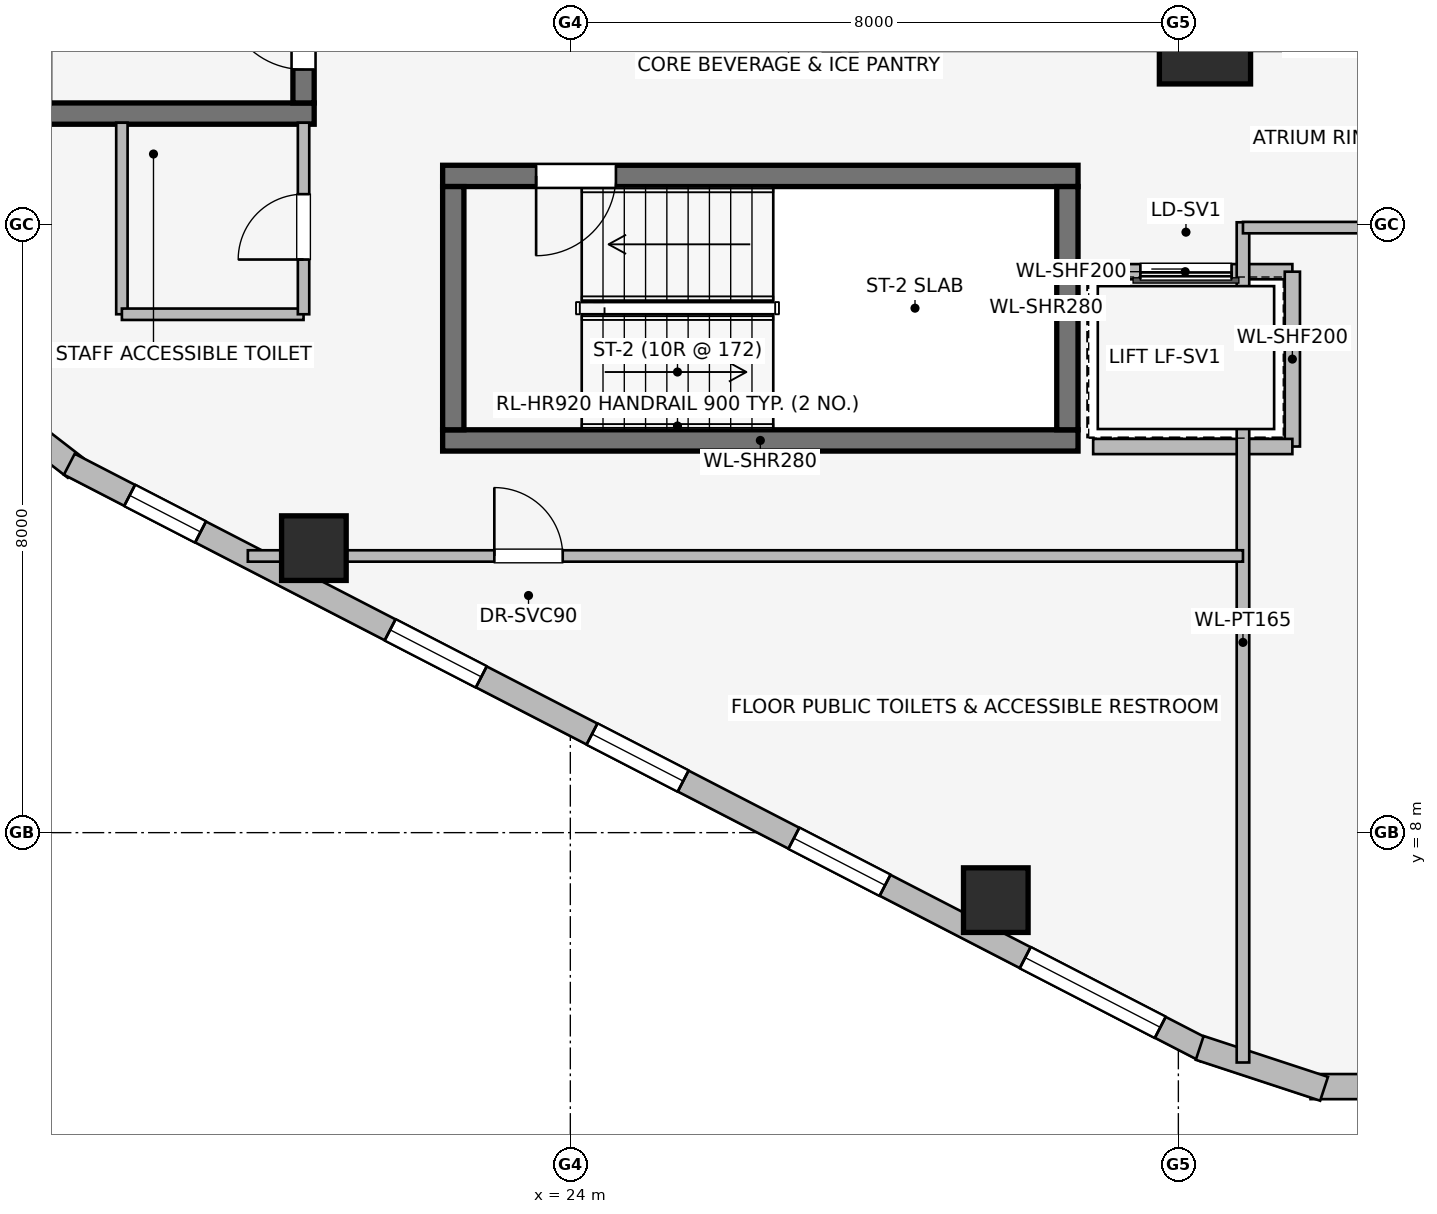
"""IFC4 building model, lengths in metres.
Left out: names, types, materials, properties, quantities, classifications, styles, units other than length and angle.
Written with IfcOpenShell. Run it as: python <this file> out.ifc"""

import sys

from ifc_helpers import new_model, si_unit, direction, frame, frame_2d, origin, origin_2d, place, context, subcontext, project, spatial, rectangle, extrude, element, fill, save


model = new_model("IFC4")
c1 = context("Model", 3, precision=1e-05, world=origin(), true_north=direction((0.0, 1.0)))
c2 = subcontext(c1, "Body", "Model", "MODEL_VIEW")
j1 = project(units=[si_unit("LENGTHUNIT", "METRE"), si_unit("PLANEANGLEUNIT", "RADIAN")], contexts=[c1])
p1 = place(None, origin())
s1 = spatial("IfcSite", under=j1, at=p1, CompositionType="ELEMENT")
p2 = place(p1, origin())
s2 = spatial("IfcBuilding", under=s1, at=p2, CompositionType="ELEMENT")
p3 = place(p2, frame((0.0, 0.0, 203.35)))
s3 = spatial("IfcBuildingStorey", under=s2, at=p3, CompositionType="ELEMENT", Elevation=203.35)
p4 = place(p3, frame((16.87, 17.46, 0.0), z_axis=(0.0, 0.0, 1.0), x_axis=(1.0, 0.0, 0.0)))
e1 = element("IfcWall", 1, at=p4, inside=s3, PredefinedType="SHEAR", context=c2, shape_type="SweptSolid", body=[
    extrude(rectangle(XDim=3.76, YDim=0.28, at=frame_2d((1.88, 0.0))), origin(), (0.0, 0.0, 1.0), 3.45),
])
p5 = place(p3, frame((20.49, 17.6, 0.0), z_axis=(0.0, 0.0, 1.0), x_axis=(0.0, 1.0, 0.0)))
e2 = element("IfcWall", 2, at=p5, inside=s3, PredefinedType="SHEAR", context=c2, shape_type="SweptSolid", body=[
    extrude(rectangle(XDim=7.8, YDim=0.28, at=frame_2d((3.9, 0.0))), origin(), (0.0, 0.0, 1.0), 3.45),
])
p6 = place(p5, frame((0.44, 0.0, 0.0)))
e3 = element("IfcOpeningElement", 3, at=p6, cuts=e2, PredefinedType="OPENING", context=c2, shape_type="SweptSolid", body=[
    extrude(rectangle(XDim=1.05, YDim=2.0, at=frame_2d((0.525, 1.0))), frame((0.0, 0.15, 0.0), z_axis=(0.0, -1.0, 0.0), x_axis=(1.0, 0.0, 0.0)), (0.0, 0.0, 1.0), 0.3),
])
p7 = place(p3, frame((22.32, 13.16, 0.0), z_axis=(0.0, 0.0, 1.0), x_axis=(1.0, 0.0, 0.0)))
e4 = element("IfcWall", 4, at=p7, inside=s3, PredefinedType="SHEAR", context=c2, shape_type="SweptSolid", body=[
    extrude(rectangle(XDim=8.36, YDim=0.28, at=frame_2d((4.18, 0.0))), origin(), (0.0, 0.0, 1.0), 3.45),
])
p8 = place(p3, frame((30.68, 16.64, 0.0), z_axis=(0.0, 0.0, 1.0), x_axis=(-1.0, 0.0, 0.0)))
e5 = element("IfcWall", 5, at=p8, inside=s3, PredefinedType="SHEAR", context=c2, shape_type="SweptSolid", body=[
    extrude(rectangle(XDim=8.36, YDim=0.28, at=frame_2d((4.18, 0.0))), origin(), (0.0, 0.0, 1.0), 3.45),
])
p9 = place(p8, frame((6.08, 0.0, 0.0)))
e6 = element("IfcOpeningElement", 6, at=p9, cuts=e5, PredefinedType="OPENING", context=c2, shape_type="SweptSolid", body=[
    extrude(rectangle(XDim=1.05, YDim=2.0, at=frame_2d((0.525, 1.0))), frame((0.0, 0.15, 0.0), z_axis=(0.0, -1.0, 0.0), x_axis=(1.0, 0.0, 0.0)), (0.0, 0.0, 1.0), 0.3),
])
for number, where, z_axis, x_axis in (
    (7, (22.46, 16.5, 0.0), (0.0, 0.0, 1.0), (0.0, -1.0, 0.0)),
    (8, (30.54, 13.3, 0.0), (0.0, 0.0, 1.0), (0.0, 1.0, 0.0)),
):
    element("IfcWall", number, at=place(p3, frame(where, z_axis=z_axis, x_axis=x_axis)), inside=s3, PredefinedType="SHEAR", context=c2, shape_type="SweptSolid", body=[
        extrude(rectangle(XDim=3.2, YDim=0.28, at=frame_2d((1.6, 0.0))), origin(), (0.0, 0.0, 1.0), 3.45),
    ])
p10 = place(p3, frame((32.35, 18.45, 0.0), z_axis=(0.0, 0.0, 1.0), x_axis=(1.0, 0.0, 0.0)))
e9 = element("IfcColumn", 9, at=p10, inside=s3, PredefinedType="COLUMN", context=c2, shape_type="SweptSolid", body=[
    extrude(rectangle(XDim=1.2, YDim=1.2, at=origin_2d()), origin(), (0.0, 0.0, 1.0), 3.45),
])
for number, where, z_axis, x_axis in (
    (10, (20.626, 11.743, 0.0), (0.0, 0.0, 1.0), (1.0, 0.0, 0.0)),
    (11, (29.598, 7.112, 0.0), (0.0, 0.0, 1.0), (1.0, 0.0, 0.0)),
):
    element("IfcColumn", number, at=place(p3, frame(where, z_axis=z_axis, x_axis=x_axis)), inside=s3, PredefinedType="COLUMN", context=c2, shape_type="SweptSolid", body=[
        extrude(rectangle(XDim=0.85, YDim=0.85, at=origin_2d()), origin(), (0.0, 0.0, 1.0), 3.45),
    ])
p11 = place(p3, frame((17.489, 12.8, 0.0), z_axis=(0.0, 0.0, 1.0), x_axis=(-0.791409877269, 0.611285862884, 0.0)))
e12 = element("IfcWall", 12, at=p11, inside=s3, PredefinedType="STANDARD", context=c2, shape_type="SweptSolid", body=[
    extrude(rectangle(XDim=1.677, YDim=0.33, at=frame_2d((0.838, 0.0))), origin(), (0.0, 0.0, 1.0), 3.19),
])
p12 = place(p3, frame((32.362, 5.129, 0.0), z_axis=(0.0, 0.0, 1.0), x_axis=(-0.888626188278, 0.458632202867, 0.0)))
e13 = element("IfcWall", 13, at=p12, inside=s3, PredefinedType="STANDARD", context=c2, shape_type="SweptSolid", body=[
    extrude(rectangle(XDim=16.828, YDim=0.31, at=frame_2d((8.414, 0.0))), origin(), (0.0, 0.0, 1.0), 3.19),
])
p13 = place(p12, frame((0.675, 0.0, 0.75)))
e14 = element("IfcOpeningElement", 14, at=p13, cuts=e13, PredefinedType="OPENING", context=c2, shape_type="SweptSolid", body=[
    extrude(rectangle(XDim=2.0, YDim=1.5, at=frame_2d((1.0, 0.75))), frame((0.0, 0.165, 0.0), z_axis=(0.0, -1.0, 0.0), x_axis=(1.0, 0.0, 0.0)), (0.0, 0.0, 1.0), 0.33),
])
p14 = place(p12, frame((4.75, 0.0, 0.75)))
e15 = element("IfcOpeningElement", 15, at=p14, cuts=e13, PredefinedType="OPENING", context=c2, shape_type="SweptSolid", body=[
    extrude(rectangle(XDim=1.35, YDim=1.45, at=frame_2d((0.675, 0.725))), frame((0.0, 0.165, 0.0), z_axis=(0.0, -1.0, 0.0), x_axis=(1.0, 0.0, 0.0)), (0.0, 0.0, 1.0), 0.33),
])
p15 = place(p12, frame((7.739, 0.0, 0.75)))
e16 = element("IfcOpeningElement", 16, at=p15, cuts=e13, PredefinedType="OPENING", context=c2, shape_type="SweptSolid", body=[
    extrude(rectangle(XDim=1.35, YDim=1.45, at=frame_2d((0.675, 0.725))), frame((0.0, 0.165, 0.0), z_axis=(0.0, -1.0, 0.0), x_axis=(1.0, 0.0, 0.0)), (0.0, 0.0, 1.0), 0.33),
])
p16 = place(p12, frame((10.728, 0.0, 0.75)))
e17 = element("IfcOpeningElement", 17, at=p16, cuts=e13, PredefinedType="OPENING", context=c2, shape_type="SweptSolid", body=[
    extrude(rectangle(XDim=1.35, YDim=1.45, at=frame_2d((0.675, 0.725))), frame((0.0, 0.165, 0.0), z_axis=(0.0, -1.0, 0.0), x_axis=(1.0, 0.0, 0.0)), (0.0, 0.0, 1.0), 0.33),
])
p17 = place(p12, frame((14.885, 0.0, 0.75)))
e18 = element("IfcOpeningElement", 18, at=p17, cuts=e13, PredefinedType="OPENING", context=c2, shape_type="SweptSolid", body=[
    extrude(rectangle(XDim=1.05, YDim=1.4, at=frame_2d((0.525, 0.7))), frame((0.0, 0.165, 0.0), z_axis=(0.0, -1.0, 0.0), x_axis=(1.0, 0.0, 0.0)), (0.0, 0.0, 1.0), 0.33),
])
p18 = place(p3, frame((35.461, 4.659, 0.0), z_axis=(0.0, 0.0, 1.0), x_axis=(-1.0, 0.0, 0.0)))
e19 = element("IfcWall", 19, at=p18, inside=s3, PredefinedType="STANDARD", context=c2, shape_type="SweptSolid", body=[
    extrude(rectangle(XDim=1.722, YDim=0.33, at=frame_2d((0.861, 0.0))), origin(), (0.0, 0.0, 1.0), 3.19),
])
p19 = place(p3, frame((33.917, 4.63, 0.0), z_axis=(0.0, 0.0, 1.0), x_axis=(-0.949937416267, 0.312440242569, 0.0)))
e20 = element("IfcWall", 20, at=p19, inside=s3, PredefinedType="STANDARD", context=c2, shape_type="SweptSolid", body=[
    extrude(rectangle(XDim=1.722, YDim=0.33, at=frame_2d((0.861, 0.0))), origin(), (0.0, 0.0, 1.0), 3.19),
])
p20 = place(p3, frame((33.5, 15.38, 0.0), z_axis=(0.0, 0.0, 1.0), x_axis=(-1.0, 0.0, 0.0)))
e21 = element("IfcWall", 21, at=p20, inside=s3, PredefinedType="PARTITIONING", context=c2, shape_type="SweptSolid", body=[
    extrude(rectangle(XDim=2.82, YDim=0.2, at=frame_2d((1.41, 0.0))), origin(), (0.0, 0.0, 1.0), 3.19),
])
p21 = place(p20, frame((0.8, 0.0, 0.0)))
e22 = element("IfcOpeningElement", 22, at=p21, cuts=e21, PredefinedType="OPENING", context=c2, shape_type="SweptSolid", body=[
    extrude(rectangle(XDim=1.2, YDim=2.2, at=frame_2d((0.6, 1.1))), frame((0.0, 0.11, 0.0), z_axis=(0.0, -1.0, 0.0), x_axis=(1.0, 0.0, 0.0)), (0.0, 0.0, 1.0), 0.22),
])
p22 = place(p3, frame((33.5, 13.08, 0.0), z_axis=(0.0, 0.0, 1.0), x_axis=(0.0, 1.0, 0.0)))
e23 = element("IfcWall", 23, at=p22, inside=s3, PredefinedType="PARTITIONING", context=c2, shape_type="SweptSolid", body=[
    extrude(rectangle(XDim=2.3, YDim=0.2, at=frame_2d((1.15, 0.0))), origin(), (0.0, 0.0, 1.0), 3.19),
])
p23 = place(p3, frame((30.879, 13.08, 0.0), z_axis=(0.0, 0.0, 1.0), x_axis=(1.0, 0.0, 0.0)))
e24 = element("IfcWall", 24, at=p23, inside=s3, PredefinedType="PARTITIONING", context=c2, shape_type="SweptSolid", body=[
    extrude(rectangle(XDim=2.621, YDim=0.2, at=frame_2d((1.311, 0.0))), origin(), (0.0, 0.0, 1.0), 3.19),
])
p24 = place(p3, frame((18.1, 17.34, 0.0), z_axis=(0.0, 0.0, 1.0), x_axis=(0.0, -1.0, 0.0)))
e25 = element("IfcWall", 25, at=p24, inside=s3, PredefinedType="PARTITIONING", context=c2, shape_type="SweptSolid", body=[
    extrude(rectangle(XDim=2.52, YDim=0.15, at=frame_2d((1.26, 0.0))), origin(), (0.0, 0.0, 1.0), 3.19),
])
p25 = place(p3, frame((18.1, 14.82, 0.0), z_axis=(0.0, 0.0, 1.0), x_axis=(1.0, 0.0, 0.0)))
e26 = element("IfcWall", 26, at=p25, inside=s3, PredefinedType="PARTITIONING", context=c2, shape_type="SweptSolid", body=[
    extrude(rectangle(XDim=2.39, YDim=0.15, at=frame_2d((1.195, 0.0))), origin(), (0.0, 0.0, 1.0), 3.19),
])
p26 = place(p3, frame((20.49, 14.82, 0.0), z_axis=(0.0, 0.0, 1.0), x_axis=(0.0, 1.0, 0.0)))
e27 = element("IfcWall", 27, at=p26, inside=s3, PredefinedType="PARTITIONING", context=c2, shape_type="SweptSolid", body=[
    extrude(rectangle(XDim=2.52, YDim=0.15, at=frame_2d((1.26, 0.0))), origin(), (0.0, 0.0, 1.0), 3.19),
])
p27 = place(p26, frame((0.72, 0.0, 0.0)))
e28 = element("IfcOpeningElement", 28, at=p27, cuts=e27, PredefinedType="OPENING", context=c2, shape_type="SweptSolid", body=[
    extrude(rectangle(XDim=0.86, YDim=2.0, at=frame_2d((0.43, 1.0))), frame((0.0, 0.085, 0.0), z_axis=(0.0, -1.0, 0.0), x_axis=(1.0, 0.0, 0.0)), (0.0, 0.0, 1.0), 0.17),
])
p28 = place(p3, frame((32.85, 4.976, 0.0), z_axis=(0.0, 0.0, 1.0), x_axis=(0.0, 1.0, 0.0)))
e29 = element("IfcWall", 29, at=p28, inside=s3, PredefinedType="PARTITIONING", context=c2, shape_type="SweptSolid", body=[
    extrude(rectangle(XDim=11.054, YDim=0.165, at=frame_2d((5.527, 0.0))), origin(), (0.0, 0.0, 1.0), 3.19),
])
p29 = place(p3, frame((19.757, 11.64, 0.0), z_axis=(0.0, 0.0, 1.0), x_axis=(1.0, 0.0, 0.0)))
e30 = element("IfcWall", 30, at=p29, inside=s3, PredefinedType="PARTITIONING", context=c2, shape_type="SweptSolid", body=[
    extrude(rectangle(XDim=13.093, YDim=0.15, at=frame_2d((6.546, 0.0))), origin(), (0.0, 0.0, 1.0), 3.19),
])
p30 = place(p29, frame((3.243, 0.0, 0.0)))
e31 = element("IfcOpeningElement", 31, at=p30, cuts=e30, PredefinedType="OPENING", context=c2, shape_type="SweptSolid", body=[
    extrude(rectangle(XDim=0.9, YDim=2.0, at=frame_2d((0.45, 1.0))), frame((0.0, 0.085, 0.0), z_axis=(0.0, -1.0, 0.0), x_axis=(1.0, 0.0, 0.0)), (0.0, 0.0, 1.0), 0.17),
])
p31 = place(p3, frame((32.85, 15.96, 0.0), z_axis=(0.0, 0.0, 1.0), x_axis=(1.0, 0.0, 0.0)))
e32 = element("IfcWall", 32, at=p31, inside=s3, PredefinedType="PARTITIONING", context=c2, shape_type="SweptSolid", body=[
    extrude(rectangle(XDim=8.61, YDim=0.15, at=frame_2d((4.305, 0.0))), origin(), (0.0, 0.0, 1.0), 3.19),
])
p32 = place(p31, frame((3.825, 0.0, 0.0)))
e33 = element("IfcOpeningElement", 33, at=p32, cuts=e32, PredefinedType="OPENING", context=c2, shape_type="SweptSolid", body=[
    extrude(rectangle(XDim=0.96, YDim=2.0, at=frame_2d((0.48, 1.0))), frame((0.0, 0.085, 0.0), z_axis=(0.0, -1.0, 0.0), x_axis=(1.0, 0.0, 0.0)), (0.0, 0.0, 1.0), 0.17),
])
p33 = place(p13, origin())
e34 = element("IfcWindow", 34, at=p33, inside=s3, PartitioningType="SINGLE_PANEL", PredefinedType="WINDOW", context=c2, shape_type="SweptSolid", body=[
    extrude(rectangle(XDim=2.0, YDim=1.5, at=frame_2d((1.0, 0.75))), frame((0.0, 0.03, 0.0), z_axis=(0.0, -1.0, 0.0), x_axis=(1.0, 0.0, 0.0)), (0.0, 0.0, 1.0), 0.06),
])
fill(e14, e34)
p34 = place(p14, origin())
e35 = element("IfcWindow", 35, at=p34, inside=s3, PartitioningType="SINGLE_PANEL", PredefinedType="WINDOW", context=c2, shape_type="SweptSolid", body=[
    extrude(rectangle(XDim=1.35, YDim=1.45, at=frame_2d((0.675, 0.725))), frame((0.0, 0.03, 0.0), z_axis=(0.0, -1.0, 0.0), x_axis=(1.0, 0.0, 0.0)), (0.0, 0.0, 1.0), 0.06),
])
fill(e15, e35)
p35 = place(p15, origin())
e36 = element("IfcWindow", 36, at=p35, inside=s3, PartitioningType="SINGLE_PANEL", PredefinedType="WINDOW", context=c2, shape_type="SweptSolid", body=[
    extrude(rectangle(XDim=1.35, YDim=1.45, at=frame_2d((0.675, 0.725))), frame((0.0, 0.03, 0.0), z_axis=(0.0, -1.0, 0.0), x_axis=(1.0, 0.0, 0.0)), (0.0, 0.0, 1.0), 0.06),
])
fill(e16, e36)
p36 = place(p16, origin())
e37 = element("IfcWindow", 37, at=p36, inside=s3, PartitioningType="SINGLE_PANEL", PredefinedType="WINDOW", context=c2, shape_type="SweptSolid", body=[
    extrude(rectangle(XDim=1.35, YDim=1.45, at=frame_2d((0.675, 0.725))), frame((0.0, 0.03, 0.0), z_axis=(0.0, -1.0, 0.0), x_axis=(1.0, 0.0, 0.0)), (0.0, 0.0, 1.0), 0.06),
])
fill(e17, e37)
p37 = place(p17, origin())
e38 = element("IfcWindow", 38, at=p37, inside=s3, PartitioningType="SINGLE_PANEL", PredefinedType="WINDOW", context=c2, shape_type="SweptSolid", body=[
    extrude(rectangle(XDim=1.05, YDim=1.4, at=frame_2d((0.525, 0.7))), frame((0.0, 0.03, 0.0), z_axis=(0.0, -1.0, 0.0), x_axis=(1.0, 0.0, 0.0)), (0.0, 0.0, 1.0), 0.06),
])
fill(e18, e38)
p38 = place(p6, origin())
e39 = element("IfcDoor", 39, at=p38, inside=s3, OperationType="SINGLE_SWING_RIGHT", PredefinedType="DOOR", context=c2, shape_type="SweptSolid", body=[
    extrude(rectangle(XDim=1.05, YDim=2.0, at=frame_2d((0.525, 1.0))), frame((0.0, 0.025, 0.0), z_axis=(0.0, -1.0, 0.0), x_axis=(1.0, 0.0, 0.0)), (0.0, 0.0, 1.0), 0.05),
])
fill(e3, e39)
p39 = place(p9, origin())
e40 = element("IfcDoor", 40, at=p39, inside=s3, OperationType="SINGLE_SWING_RIGHT", PredefinedType="DOOR", context=c2, shape_type="SweptSolid", body=[
    extrude(rectangle(XDim=1.05, YDim=2.0, at=frame_2d((0.525, 1.0))), frame((0.0, 0.025, 0.0), z_axis=(0.0, -1.0, 0.0), x_axis=(1.0, 0.0, 0.0)), (0.0, 0.0, 1.0), 0.05),
])
fill(e6, e40)
p40 = place(p21, origin())
e41 = element("IfcDoor", 41, at=p40, inside=s3, OperationType="SLIDING_TO_RIGHT", PredefinedType="DOOR", context=c2, shape_type="SweptSolid", body=[
    extrude(rectangle(XDim=1.2, YDim=2.2, at=frame_2d((0.6, 1.1))), frame((0.0, 0.025, 0.0), z_axis=(0.0, -1.0, 0.0), x_axis=(1.0, 0.0, 0.0)), (0.0, 0.0, 1.0), 0.05),
])
fill(e22, e41)
p41 = place(p27, origin())
e42 = element("IfcDoor", 42, at=p41, inside=s3, OperationType="SINGLE_SWING_LEFT", PredefinedType="DOOR", context=c2, shape_type="SweptSolid", body=[
    extrude(rectangle(XDim=0.86, YDim=2.0, at=frame_2d((0.43, 1.0))), frame((0.0, 0.025, 0.0), z_axis=(0.0, -1.0, 0.0), x_axis=(1.0, 0.0, 0.0)), (0.0, 0.0, 1.0), 0.05),
])
fill(e28, e42)
p42 = place(p30, origin())
e43 = element("IfcDoor", 43, at=p42, inside=s3, OperationType="SINGLE_SWING_LEFT", PredefinedType="DOOR", context=c2, shape_type="SweptSolid", body=[
    extrude(rectangle(XDim=0.9, YDim=2.0, at=frame_2d((0.45, 1.0))), frame((0.0, 0.025, 0.0), z_axis=(0.0, -1.0, 0.0), x_axis=(1.0, 0.0, 0.0)), (0.0, 0.0, 1.0), 0.05),
])
fill(e31, e43)
save(model, sys.argv[1])
